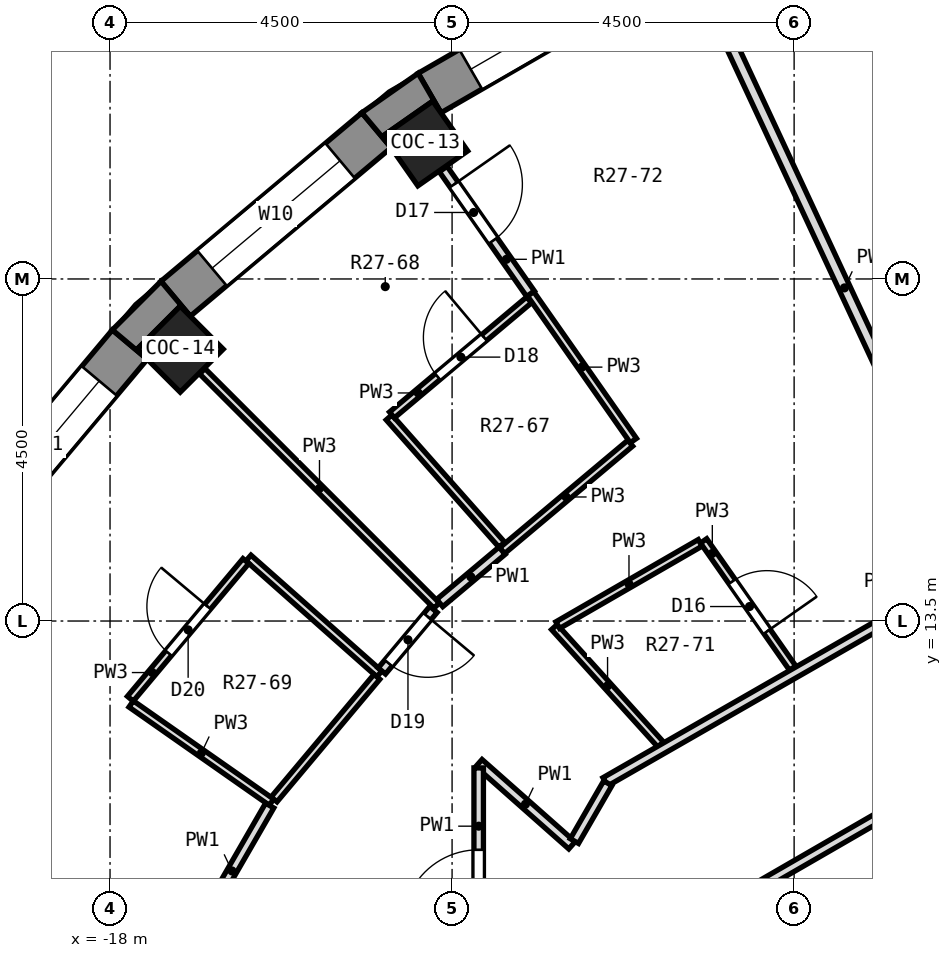
"""IFC4 building model, lengths in metres.
Left out: names, types, materials, properties, quantities, classifications, styles, units other than length and angle.
Written with IfcOpenShell. Run it as: python <this file> out.ifc"""

import sys

from ifc_helpers import new_model, si_unit, direction, frame, frame_2d, origin, origin_2d, place, context, subcontext, project, spatial, polyline, rectangle, outline, extrude, element, fill, save


model = new_model("IFC4")
c1 = context("Model", 3, precision=1e-05, world=origin(), true_north=direction((0.0, 1.0)))
c2 = subcontext(c1, "Body", "Model", "MODEL_VIEW")
j1 = project(units=[si_unit("LENGTHUNIT", "METRE"), si_unit("PLANEANGLEUNIT", "RADIAN")], contexts=[c1])
p1 = place(None, origin())
s1 = spatial("IfcSite", under=j1, at=p1, CompositionType="ELEMENT")
p2 = place(p1, origin())
s2 = spatial("IfcBuilding", under=s1, at=p2, CompositionType="ELEMENT")
p3 = place(p2, frame((0.0, 0.0, 180.6)))
s3 = spatial("IfcBuildingStorey", under=s2, at=p3, CompositionType="ELEMENT", Elevation=180.6)
for number, where, z_axis, x_axis in (
    (1, (-13.852, 19.782, 0.0), (0.0, 0.0, 1.0), (-0.574, 0.819, 0.0)),
    (2, (-17.077, 17.077, 0.0), (0.0, 0.0, 1.0), (-0.707, 0.707, 0.0)),
):
    element("IfcColumn", number, at=place(p3, frame(where, z_axis=z_axis, x_axis=x_axis)), inside=s3, PredefinedType="COLUMN", context=c2, shape_type="SweptSolid", body=[
        extrude(rectangle(XDim=0.8, YDim=0.8, at=origin_2d()), origin(), (0.0, 0.0, 1.0), 3.3),
    ])
p4 = place(p3, frame((-10.809, 22.171, 0.0), z_axis=(0.0, 0.0, 1.0), x_axis=(-0.86602648383, -0.499998129301, 0.0)))
e3 = element("IfcWall", 3, at=p4, inside=s3, PredefinedType="SOLIDWALL", context=c2, shape_type="SweptSolid", body=[
    extrude(rectangle(XDim=3.45, YDim=0.6, at=frame_2d((1.725, 0.0))), origin(), (0.0, 0.0, 1.0), 2.85),
])
p5 = place(p4, frame((0.625, 0.0, 0.9)))
e4 = element("IfcOpeningElement", 4, at=p5, cuts=e3, PredefinedType="OPENING", context=c2, shape_type="SweptSolid", body=[
    extrude(rectangle(XDim=2.2, YDim=1.8, at=frame_2d((1.1, 0.9))), frame((0.0, 0.312, 0.0), z_axis=(0.0, -1.0, 0.0), x_axis=(1.0, 0.0, 0.0)), (0.0, 0.0, 1.0), 0.624),
])
p6 = place(p3, frame((-14.494, 19.957, 0.0), z_axis=(0.0, 0.0, 1.0), x_axis=(-0.766058884809, -0.642770398358, 0.0)))
e5 = element("IfcWall", 5, at=p6, inside=s3, PredefinedType="SOLIDWALL", context=c2, shape_type="SweptSolid", body=[
    extrude(rectangle(XDim=3.449, YDim=0.6, at=frame_2d((1.725, 0.0))), origin(), (0.0, 0.0, 1.0), 2.85),
])
p7 = place(p6, frame((0.625, 0.0, 0.9)))
e6 = element("IfcOpeningElement", 6, at=p7, cuts=e5, PredefinedType="OPENING", context=c2, shape_type="SweptSolid", body=[
    extrude(rectangle(XDim=2.2, YDim=1.8, at=frame_2d((1.1, 0.9))), frame((0.0, 0.312, 0.0), z_axis=(0.0, -1.0, 0.0), x_axis=(1.0, 0.0, 0.0)), (0.0, 0.0, 1.0), 0.624),
])
p8 = place(p3, frame((-17.74, 17.137, 0.0), z_axis=(0.0, 0.0, 1.0), x_axis=(-0.642770398358, -0.766058884809, 0.0)))
e7 = element("IfcWall", 7, at=p8, inside=s3, PredefinedType="SOLIDWALL", context=c2, shape_type="SweptSolid", body=[
    extrude(rectangle(XDim=3.449, YDim=0.6, at=frame_2d((1.725, 0.0))), origin(), (0.0, 0.0, 1.0), 2.85),
])
p9 = place(p8, frame((0.625, 0.0, 0.9)))
e8 = element("IfcOpeningElement", 8, at=p9, cuts=e7, PredefinedType="OPENING", context=c2, shape_type="SweptSolid", body=[
    extrude(rectangle(XDim=2.2, YDim=1.8, at=frame_2d((1.1, 0.9))), frame((0.0, 0.312, 0.0), z_axis=(0.0, -1.0, 0.0), x_axis=(1.0, 0.0, 0.0)), (0.0, 0.0, 1.0), 0.624),
])
p10 = place(p3, origin())
e9 = element("IfcWall", 9, at=p10, inside=s3, PredefinedType="SOLIDWALL", context=c2, shape_type="SweptSolid", body=[
    extrude(outline(polyline([(-13.946, 20.706), (-14.687, 20.187), (-14.302, 19.727), (-14.409, 19.881), (-13.754, 20.34), (-13.646, 20.186), (-13.946, 20.706)])), origin(), (0.0, 0.0, 1.0), 2.85),
])
p11 = place(p3, origin())
e10 = element("IfcWall", 10, at=p11, inside=s3, PredefinedType="SOLIDWALL", context=c2, shape_type="SweptSolid", body=[
    extrude(outline(polyline([(-17.969, 17.33), (-17.51, 16.944), (-17.642, 17.077), (-17.077, 17.642), (-16.944, 17.51), (-17.33, 17.969), (-17.969, 17.33)])), origin(), (0.0, 0.0, 1.0), 2.85),
])
p12 = place(p3, frame((-10.031, 21.517, 0.0), z_axis=(0.0, 0.0, 1.0), x_axis=(0.422305280768, -0.906453666679, 0.0)))
e11 = element("IfcWall", 11, at=p12, inside=s3, PredefinedType="PARTITIONING", context=c2, shape_type="SweptSolid", body=[
    extrude(rectangle(XDim=8.018, YDim=0.15, at=frame_2d((4.009, 0.0))), origin(), (0.0, 0.0, 1.0), 2.85),
])
p13 = place(p3, frame((-12.468, 17.806, 0.0), z_axis=(0.0, 0.0, 1.0), x_axis=(0.573594339991, -0.819139507734, 0.0)))
e12 = element("IfcWall", 12, at=p13, inside=s3, PredefinedType="PARTITIONING", context=c2, shape_type="SweptSolid", body=[
    extrude(rectangle(XDim=2.358, YDim=0.1, at=frame_2d((1.179, 0.0))), origin(), (0.0, 0.0, 1.0), 2.85),
])
p14 = place(p3, frame((-10.191, 14.554, 0.0), z_axis=(0.0, 0.0, 1.0), x_axis=(0.573534545192, -0.819181375198, 0.0)))
e13 = element("IfcWall", 13, at=p14, inside=s3, PredefinedType="PARTITIONING", context=c2, shape_type="SweptSolid", body=[
    extrude(rectangle(XDim=2.042, YDim=0.1, at=frame_2d((1.021, 0.0))), origin(), (0.0, 0.0, 1.0), 2.85),
])
p15 = place(p14, frame((0.654, 0.0, 0.0)))
e14 = element("IfcOpeningElement", 14, at=p15, cuts=e13, PredefinedType="OPENING", context=c2, shape_type="SweptSolid", body=[
    extrude(rectangle(XDim=0.8, YDim=2.1, at=frame_2d((0.4, 1.05))), frame((0.0, 0.062, 0.0), z_axis=(0.0, -1.0, 0.0), x_axis=(1.0, 0.0, 0.0)), (0.0, 0.0, 1.0), 0.124),
])
p16 = place(p3, frame((-13.617, 19.447, 0.0), z_axis=(0.0, 0.0, 1.0), x_axis=(0.573568678046, -0.819157476658, 0.0)))
e15 = element("IfcWall", 15, at=p16, inside=s3, PredefinedType="PARTITIONING", context=c2, shape_type="SweptSolid", body=[
    extrude(rectangle(XDim=2.003, YDim=0.125, at=frame_2d((1.001, 0.0))), origin(), (0.0, 0.0, 1.0), 2.85),
])
p17 = place(p16, frame((0.248, 0.0, 0.0)))
e16 = element("IfcOpeningElement", 16, at=p17, cuts=e15, PredefinedType="OPENING", context=c2, shape_type="SweptSolid", body=[
    extrude(rectangle(XDim=0.9, YDim=2.1, at=frame_2d((0.45, 1.05))), frame((0.0, 0.074, 0.0), z_axis=(0.0, -1.0, 0.0), x_axis=(1.0, 0.0, 0.0)), (0.0, 0.0, 1.0), 0.149),
])
p18 = place(p3, frame((-14.329, 16.179, 0.0), z_axis=(0.0, 0.0, 1.0), x_axis=(0.663042232896, -0.748581991098, 0.0)))
e17 = element("IfcWall", 17, at=p18, inside=s3, PredefinedType="PARTITIONING", context=c2, shape_type="SweptSolid", body=[
    extrude(rectangle(XDim=2.238, YDim=0.1, at=frame_2d((1.119, 0.0))), origin(), (0.0, 0.0, 1.0), 2.85),
])
p19 = place(p3, frame((-12.154, 13.421, 0.0), z_axis=(0.0, 0.0, 1.0), x_axis=(0.670986897281, -0.741469206156, 0.0)))
e18 = element("IfcWall", 18, at=p19, inside=s3, PredefinedType="PARTITIONING", context=c2, shape_type="SweptSolid", body=[
    extrude(rectangle(XDim=2.085, YDim=0.1, at=frame_2d((1.042, 0.0))), origin(), (0.0, 0.0, 1.0), 2.85),
])
p20 = place(p3, frame((-16.787, 16.787, 0.0), z_axis=(0.0, 0.0, 1.0), x_axis=(0.707106781187, -0.707106781187, 0.0)))
e19 = element("IfcWall", 19, at=p20, inside=s3, PredefinedType="PARTITIONING", context=c2, shape_type="SweptSolid", body=[
    extrude(rectangle(XDim=4.361, YDim=0.1, at=frame_2d((2.181, 0.0))), origin(), (0.0, 0.0, 1.0), 2.85),
])
p21 = place(p3, frame((-16.179, 14.329, 0.0), z_axis=(0.0, 0.0, 1.0), x_axis=(0.74859119091, -0.663031846061, 0.0)))
e20 = element("IfcWall", 20, at=p21, inside=s3, PredefinedType="PARTITIONING", context=c2, shape_type="SweptSolid", body=[
    extrude(rectangle(XDim=2.3, YDim=0.1, at=frame_2d((1.15, 0.0))), origin(), (0.0, 0.0, 1.0), 2.85),
])
p22 = place(p3, frame((-13.147, 11.631, 0.0), z_axis=(0.0, 0.0, 1.0), x_axis=(0.748973743587, -0.66259967659, 0.0)))
e21 = element("IfcWall", 21, at=p22, inside=s3, PredefinedType="PARTITIONING", context=c2, shape_type="SweptSolid", body=[
    extrude(rectangle(XDim=1.634, YDim=0.125, at=frame_2d((0.817, 0.0))), origin(), (0.0, 0.0, 1.0), 2.85),
])
p23 = place(p3, frame((-17.722, 12.409, 0.0), z_axis=(0.0, 0.0, 1.0), x_axis=(0.819165747117, -0.573556866187, 0.0)))
e22 = element("IfcWall", 22, at=p23, inside=s3, PredefinedType="PARTITIONING", context=c2, shape_type="SweptSolid", body=[
    extrude(rectangle(XDim=2.253, YDim=0.1, at=frame_2d((1.127, 0.0))), origin(), (0.0, 0.0, 1.0), 2.85),
])
p24 = place(p3, frame((-11.484, 11.385, 0.0), z_axis=(0.0, 0.0, 1.0), x_axis=(0.867331679026, 0.49773060842, 0.0)))
e23 = element("IfcWall", 23, at=p24, inside=s3, PredefinedType="PARTITIONING", context=c2, shape_type="SweptSolid", body=[
    extrude(rectangle(XDim=8.371, YDim=0.125, at=frame_2d((4.185, 0.0))), origin(), (0.0, 0.0, 1.0), 2.85),
])
p25 = place(p24, frame((6.575, 0.0, 0.0)))
e24 = element("IfcOpeningElement", 24, at=p25, cuts=e23, PredefinedType="OPENING", context=c2, shape_type="SweptSolid", body=[
    extrude(rectangle(XDim=0.9, YDim=2.1, at=frame_2d((0.45, 1.05))), frame((0.0, 0.074, 0.0), z_axis=(0.0, -1.0, 0.0), x_axis=(1.0, 0.0, 0.0)), (0.0, 0.0, 1.0), 0.149),
])
p26 = place(p3, frame((-9.871, 9.773, 0.0), z_axis=(0.0, 0.0, 1.0), x_axis=(0.865954448031, 0.500122878836, 0.0)))
e25 = element("IfcWall", 25, at=p26, inside=s3, PredefinedType="PARTITIONING", context=c2, shape_type="SweptSolid", body=[
    extrude(rectangle(XDim=7.177, YDim=0.125, at=frame_2d((3.589, 0.0))), origin(), (0.0, 0.0, 1.0), 2.85),
])
p27 = place(p26, frame((3.112, 0.0, 0.0)))
e26 = element("IfcOpeningElement", 26, at=p27, cuts=e25, PredefinedType="OPENING", context=c2, shape_type="SweptSolid", body=[
    extrude(rectangle(XDim=1.0, YDim=2.1, at=frame_2d((0.5, 1.05))), frame((0.0, 0.074, 0.0), z_axis=(0.0, -1.0, 0.0), x_axis=(1.0, 0.0, 0.0)), (0.0, 0.0, 1.0), 0.149),
])
p28 = place(p3, frame((-12.11, 13.446, 0.0), z_axis=(0.0, 0.0, 1.0), x_axis=(0.865956302405, 0.500119668004, 0.0)))
e27 = element("IfcWall", 27, at=p28, inside=s3, PredefinedType="PARTITIONING", context=c2, shape_type="SweptSolid", body=[
    extrude(rectangle(XDim=2.164, YDim=0.1, at=frame_2d((1.082, 0.0))), origin(), (0.0, 0.0, 1.0), 2.85),
])
p29 = place(p3, frame((-12.842, 14.425, 0.0), z_axis=(0.0, 0.0, 1.0), x_axis=(0.766089344118, 0.642734094964, 0.0)))
e28 = element("IfcWall", 28, at=p29, inside=s3, PredefinedType="PARTITIONING", context=c2, shape_type="SweptSolid", body=[
    extrude(rectangle(XDim=2.201, YDim=0.1, at=frame_2d((1.101, 0.0))), origin(), (0.0, 0.0, 1.0), 2.85),
])
p30 = place(p3, frame((-13.663, 13.737, 0.0), z_axis=(0.0, 0.0, 1.0), x_axis=(0.766198786717, 0.642603625288, 0.0)))
e29 = element("IfcWall", 29, at=p30, inside=s3, PredefinedType="PARTITIONING", context=c2, shape_type="SweptSolid", body=[
    extrude(rectangle(XDim=1.071, YDim=0.125, at=frame_2d((0.535, 0.0))), origin(), (0.0, 0.0, 1.0), 2.85),
])
p31 = place(p3, frame((-14.291, 16.211, 0.0), z_axis=(0.0, 0.0, 1.0), x_axis=(0.766049914327, 0.642781089299, 0.0)))
e30 = element("IfcWall", 30, at=p31, inside=s3, PredefinedType="PARTITIONING", context=c2, shape_type="SweptSolid", body=[
    extrude(rectangle(XDim=2.355, YDim=0.1, at=frame_2d((1.177, 0.0))), origin(), (0.0, 0.0, 1.0), 2.85),
])
p32 = place(p31, frame((0.784, 0.0, 0.0)))
e31 = element("IfcOpeningElement", 31, at=p32, cuts=e30, PredefinedType="OPENING", context=c2, shape_type="SweptSolid", body=[
    extrude(rectangle(XDim=0.8, YDim=2.1, at=frame_2d((0.4, 1.05))), frame((0.0, 0.062, 0.0), z_axis=(0.0, -1.0, 0.0), x_axis=(1.0, 0.0, 0.0)), (0.0, 0.0, 1.0), 0.124),
])
p33 = place(p3, frame((-15.842, 11.153, 0.0), z_axis=(0.0, 0.0, 1.0), x_axis=(0.642759429892, 0.766068087891, 0.0)))
e32 = element("IfcWall", 32, at=p33, inside=s3, PredefinedType="PARTITIONING", context=c2, shape_type="SweptSolid", body=[
    extrude(rectangle(XDim=2.105, YDim=0.1, at=frame_2d((1.052, 0.0))), origin(), (0.0, 0.0, 1.0), 2.85),
])
p34 = place(p3, frame((-14.424, 12.843, 0.0), z_axis=(0.0, 0.0, 1.0), x_axis=(0.642498544186, 0.766286904964, 0.0)))
e33 = element("IfcWall", 33, at=p34, inside=s3, PredefinedType="PARTITIONING", context=c2, shape_type="SweptSolid", body=[
    extrude(rectangle(XDim=1.057, YDim=0.125, at=frame_2d((0.529, 0.0))), origin(), (0.0, 0.0, 1.0), 2.85),
])
p35 = place(p34, frame((0.135, 0.0, 0.0)))
e34 = element("IfcOpeningElement", 34, at=p35, cuts=e33, PredefinedType="OPENING", context=c2, shape_type="SweptSolid", body=[
    extrude(rectangle(XDim=0.8, YDim=2.1, at=frame_2d((0.4, 1.05))), frame((0.0, 0.074, 0.0), z_axis=(0.0, -1.0, 0.0), x_axis=(1.0, 0.0, 0.0)), (0.0, 0.0, 1.0), 0.149),
])
p36 = place(p3, frame((-17.733, 12.477, 0.0), z_axis=(0.0, 0.0, 1.0), x_axis=(0.64278038415, 0.766050506006, 0.0)))
e35 = element("IfcWall", 35, at=p36, inside=s3, PredefinedType="PARTITIONING", context=c2, shape_type="SweptSolid", body=[
    extrude(rectangle(XDim=2.365, YDim=0.1, at=frame_2d((1.182, 0.0))), origin(), (0.0, 0.0, 1.0), 2.85),
])
p37 = place(p36, frame((0.783, 0.0, 0.0)))
e36 = element("IfcOpeningElement", 36, at=p37, cuts=e35, PredefinedType="OPENING", context=c2, shape_type="SweptSolid", body=[
    extrude(rectangle(XDim=0.8, YDim=2.1, at=frame_2d((0.4, 1.05))), frame((0.0, 0.062, 0.0), z_axis=(0.0, -1.0, 0.0), x_axis=(1.0, 0.0, 0.0)), (0.0, 0.0, 1.0), 0.124),
])
p38 = place(p3, frame((-11.891, 10.605, 0.0), z_axis=(0.0, 0.0, 1.0), x_axis=(0.500203519255, 0.865907869998, 0.0)))
e37 = element("IfcWall", 37, at=p38, inside=s3, PredefinedType="PARTITIONING", context=c2, shape_type="SweptSolid", body=[
    extrude(rectangle(XDim=0.879, YDim=0.125, at=frame_2d((0.439, 0.0))), origin(), (0.0, 0.0, 1.0), 2.85),
])
p39 = place(p3, frame((-16.892, 9.352, 0.0), z_axis=(0.0, 0.0, 1.0), x_axis=(0.499683424426, 0.866208101644, 0.0)))
e38 = element("IfcWall", 38, at=p39, inside=s3, PredefinedType="PARTITIONING", context=c2, shape_type="SweptSolid", body=[
    extrude(rectangle(XDim=1.986, YDim=0.125, at=frame_2d((0.993, 0.0))), origin(), (0.0, 0.0, 1.0), 2.85),
])
p40 = place(p3, frame((-13.15, 9.351, 0.0), z_axis=(0.0, 0.0, 1.0), x_axis=(0.0, 1.0, 0.0)))
e39 = element("IfcWall", 39, at=p40, inside=s3, PredefinedType="PARTITIONING", context=c2, shape_type="SweptSolid", body=[
    extrude(rectangle(XDim=2.216, YDim=0.125, at=frame_2d((1.108, 0.0))), origin(), (0.0, 0.0, 1.0), 2.85),
])
p41 = place(p40, frame((0.139, 0.0, 0.0)))
e40 = element("IfcOpeningElement", 40, at=p41, cuts=e39, PredefinedType="OPENING", context=c2, shape_type="SweptSolid", body=[
    extrude(rectangle(XDim=1.0, YDim=2.1, at=frame_2d((0.5, 1.05))), frame((0.0, 0.074, 0.0), z_axis=(0.0, -1.0, 0.0), x_axis=(1.0, 0.0, 0.0)), (0.0, 0.0, 1.0), 0.149),
])
p42 = place(p5, origin())
e41 = element("IfcWindow", 41, at=p42, inside=s3, PartitioningType="SINGLE_PANEL", PredefinedType="WINDOW", context=c2, shape_type="SweptSolid", body=[
    extrude(rectangle(XDim=2.2, YDim=1.8, at=frame_2d((1.1, 0.9))), frame((0.0, 0.18, 0.0), z_axis=(0.0, -1.0, 0.0), x_axis=(1.0, 0.0, 0.0)), (0.0, 0.0, 1.0), 0.06),
])
fill(e4, e41)
p43 = place(p7, origin())
e42 = element("IfcWindow", 42, at=p43, inside=s3, PartitioningType="SINGLE_PANEL", PredefinedType="WINDOW", context=c2, shape_type="SweptSolid", body=[
    extrude(rectangle(XDim=2.2, YDim=1.8, at=frame_2d((1.1, 0.9))), frame((0.0, 0.18, 0.0), z_axis=(0.0, -1.0, 0.0), x_axis=(1.0, 0.0, 0.0)), (0.0, 0.0, 1.0), 0.06),
])
fill(e6, e42)
p44 = place(p9, origin())
e43 = element("IfcWindow", 43, at=p44, inside=s3, PartitioningType="SINGLE_PANEL", PredefinedType="WINDOW", context=c2, shape_type="SweptSolid", body=[
    extrude(rectangle(XDim=2.2, YDim=1.8, at=frame_2d((1.1, 0.9))), frame((0.0, 0.18, 0.0), z_axis=(0.0, -1.0, 0.0), x_axis=(1.0, 0.0, 0.0)), (0.0, 0.0, 1.0), 0.06),
])
fill(e8, e43)
p45 = place(p15, origin())
e44 = element("IfcDoor", 44, at=p45, inside=s3, OperationType="SINGLE_SWING_RIGHT", PredefinedType="DOOR", context=c2, shape_type="SweptSolid", body=[
    extrude(rectangle(XDim=0.8, YDim=2.1, at=frame_2d((0.4, 1.05))), frame((0.0, 0.025, 0.0), z_axis=(0.0, -1.0, 0.0), x_axis=(1.0, 0.0, 0.0)), (0.0, 0.0, 1.0), 0.05),
])
fill(e14, e44)
p46 = place(p17, origin())
e45 = element("IfcDoor", 45, at=p46, inside=s3, OperationType="SINGLE_SWING_LEFT", PredefinedType="DOOR", context=c2, shape_type="SweptSolid", body=[
    extrude(rectangle(XDim=0.9, YDim=2.1, at=frame_2d((0.45, 1.05))), frame((0.0, 0.025, 0.0), z_axis=(0.0, -1.0, 0.0), x_axis=(1.0, 0.0, 0.0)), (0.0, 0.0, 1.0), 0.05),
])
fill(e16, e45)
p47 = place(p32, origin())
e46 = element("IfcDoor", 46, at=p47, inside=s3, OperationType="SINGLE_SWING_RIGHT", PredefinedType="DOOR", context=c2, shape_type="SweptSolid", body=[
    extrude(rectangle(XDim=0.8, YDim=2.1, at=frame_2d((0.4, 1.05))), frame((0.0, 0.025, 0.0), z_axis=(0.0, -1.0, 0.0), x_axis=(1.0, 0.0, 0.0)), (0.0, 0.0, 1.0), 0.05),
])
fill(e31, e46)
p48 = place(p35, frame((0.8, 0.0, 0.0), z_axis=(0.0, 0.0, 1.0), x_axis=(-1.0, 0.0, 0.0)))
e47 = element("IfcDoor", 47, at=p48, inside=s3, OperationType="SINGLE_SWING_LEFT", PredefinedType="DOOR", context=c2, shape_type="SweptSolid", body=[
    extrude(rectangle(XDim=0.8, YDim=2.1, at=frame_2d((0.4, 1.05))), frame((0.0, 0.025, 0.0), z_axis=(0.0, -1.0, 0.0), x_axis=(1.0, 0.0, 0.0)), (0.0, 0.0, 1.0), 0.05),
])
fill(e34, e47)
p49 = place(p37, origin())
e48 = element("IfcDoor", 48, at=p49, inside=s3, OperationType="SINGLE_SWING_RIGHT", PredefinedType="DOOR", context=c2, shape_type="SweptSolid", body=[
    extrude(rectangle(XDim=0.8, YDim=2.1, at=frame_2d((0.4, 1.05))), frame((0.0, 0.025, 0.0), z_axis=(0.0, -1.0, 0.0), x_axis=(1.0, 0.0, 0.0)), (0.0, 0.0, 1.0), 0.05),
])
fill(e36, e48)
p50 = place(p41, origin())
e49 = element("IfcDoor", 49, at=p50, inside=s3, OperationType="SINGLE_SWING_LEFT", PredefinedType="DOOR", context=c2, shape_type="SweptSolid", body=[
    extrude(rectangle(XDim=1.0, YDim=2.1, at=frame_2d((0.5, 1.05))), frame((0.0, 0.025, 0.0), z_axis=(0.0, -1.0, 0.0), x_axis=(1.0, 0.0, 0.0)), (0.0, 0.0, 1.0), 0.05),
])
fill(e40, e49)
save(model, sys.argv[1])
